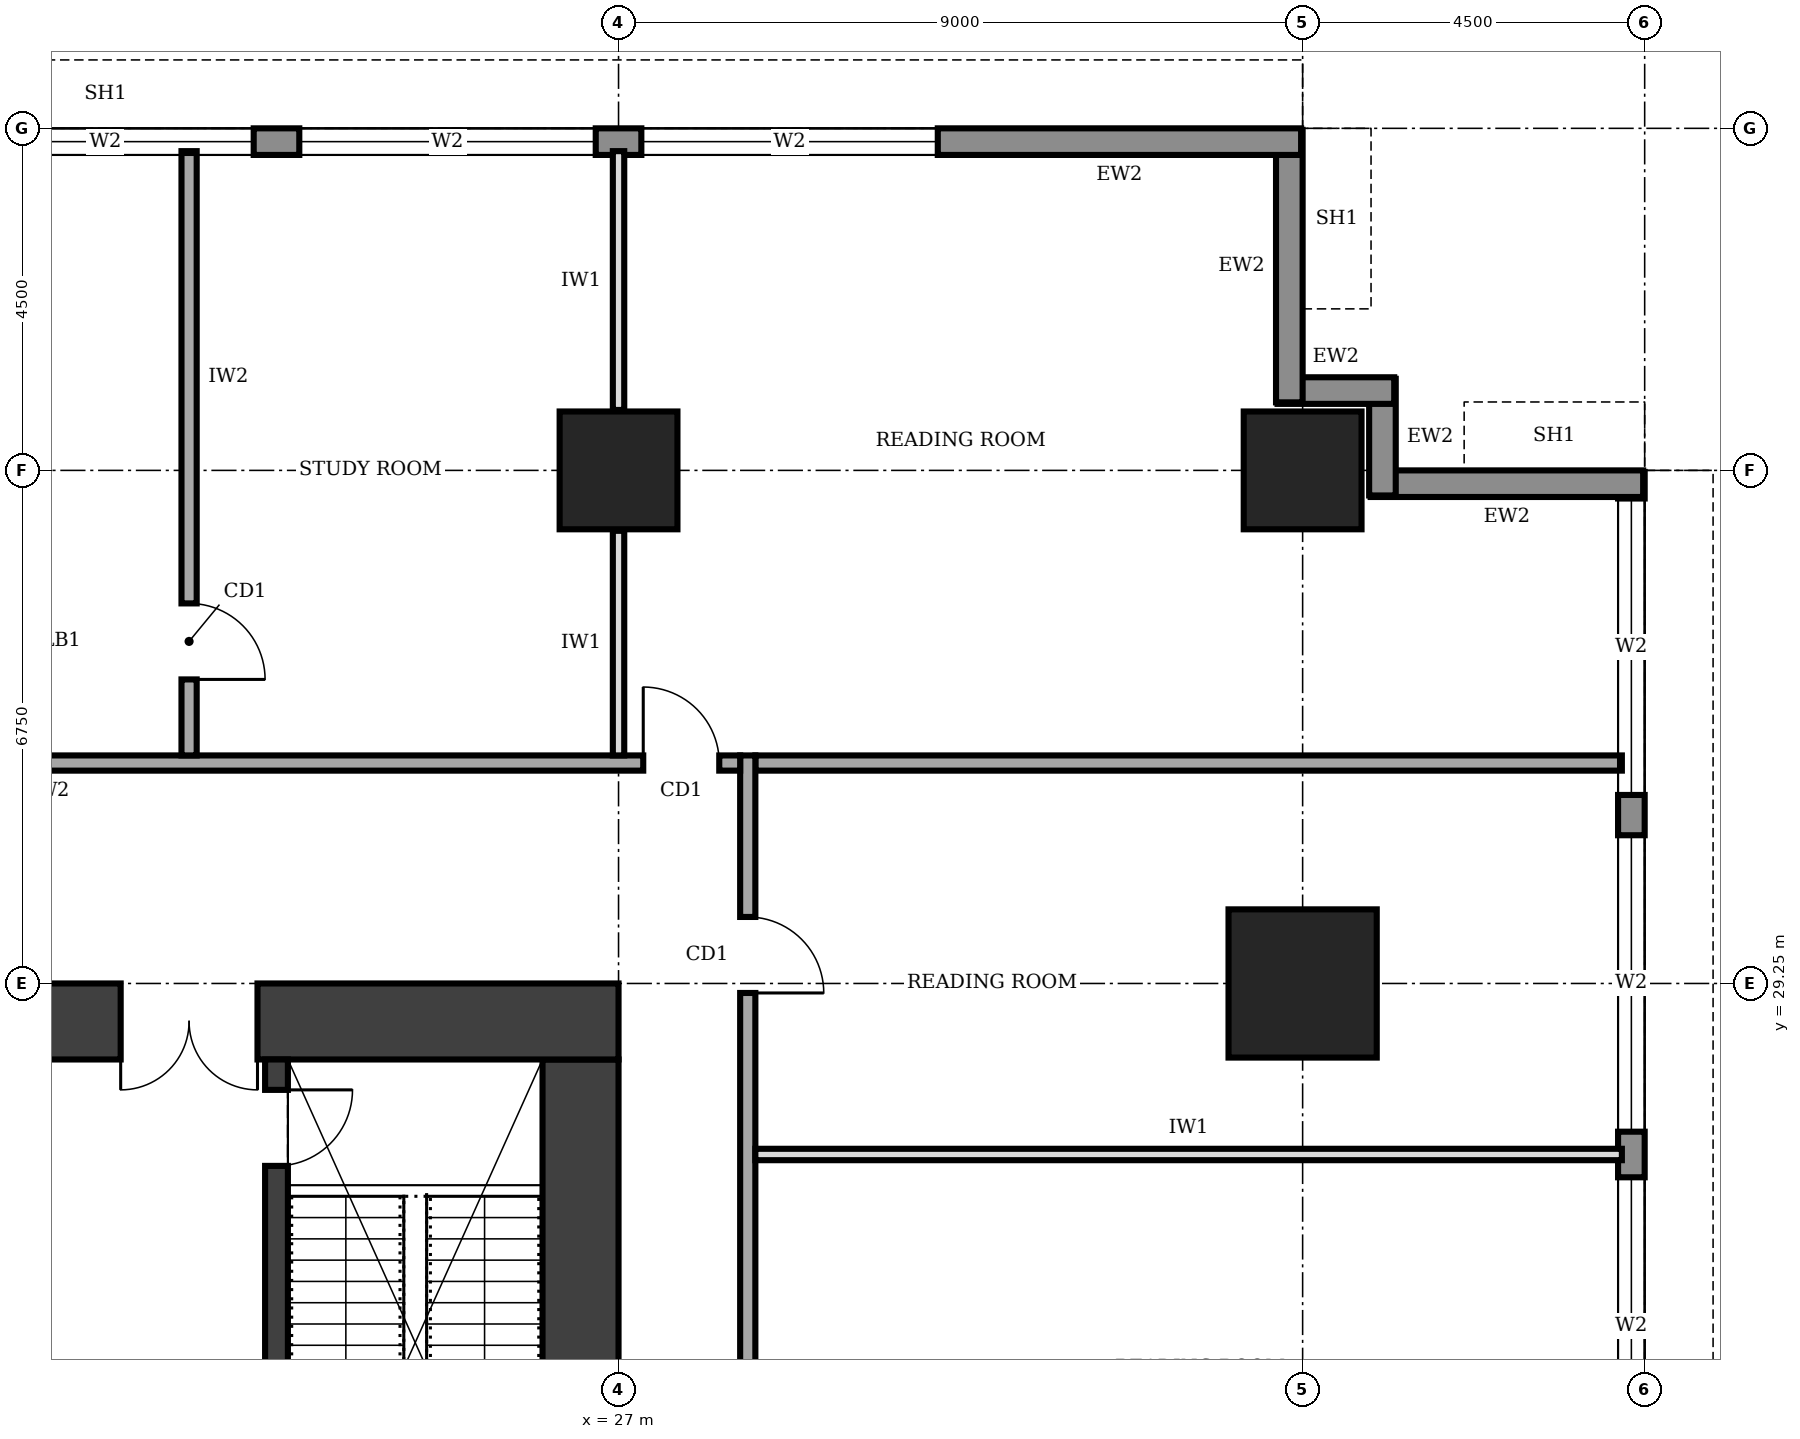
"""IFC4 building model, lengths in metres.
Left out: names, types, materials, properties, quantities, classifications, styles, units other than length and angle.
Written with IfcOpenShell. Run it as: python <this file> out.ifc"""

import sys

from ifc_helpers import new_model, si_unit, direction, frame, frame_2d, origin, origin_2d, place, context, subcontext, project, spatial, rectangle, extrude, element, fill, save


model = new_model("IFC4")
c1 = context("Model", 3, precision=1e-05, world=origin(), true_north=direction((0.0, 1.0)))
c2 = subcontext(c1, "Body", "Model", "MODEL_VIEW")
j1 = project(units=[si_unit("LENGTHUNIT", "METRE"), si_unit("PLANEANGLEUNIT", "RADIAN")], contexts=[c1])
p1 = place(None, origin())
s1 = spatial("IfcSite", under=j1, at=p1, CompositionType="ELEMENT")
p2 = place(p1, origin())
s2 = spatial("IfcBuilding", under=s1, at=p2, CompositionType="ELEMENT")
p3 = place(p2, frame((0.0, 0.0, 237.0)))
s3 = spatial("IfcBuildingStorey", under=s2, at=p3, CompositionType="ELEMENT", Elevation=237.0)
p4 = place(p3, frame((26.5, 12.25, 0.0), z_axis=(0.0, 0.0, 1.0), x_axis=(0.0, 1.0, 0.0)))
e1 = element("IfcWall", 1, at=p4, inside=s3, PredefinedType="SHEAR", context=c2, shape_type="SweptSolid", body=[
    extrude(rectangle(XDim=16.0, YDim=1.0, at=frame_2d((8.0, 0.0))), origin(), (0.0, 0.0, 1.0), 4.0),
])
p5 = place(p3, frame((27.0, 28.75, 0.0), z_axis=(0.0, 0.0, 1.0), x_axis=(-1.0, 0.0, 0.0)))
e2 = element("IfcWall", 2, at=p5, inside=s3, PredefinedType="SHEAR", context=c2, shape_type="SweptSolid", body=[
    extrude(rectangle(XDim=13.5, YDim=1.0, at=frame_2d((6.75, 0.0))), origin(), (0.0, 0.0, 1.0), 4.0),
])
p6 = place(p5, frame((4.75, 0.0, 0.0)))
e3 = element("IfcOpeningElement", 3, at=p6, cuts=e2, PredefinedType="OPENING", context=c2, shape_type="SweptSolid", body=[
    extrude(rectangle(XDim=1.8, YDim=2.1, at=frame_2d((0.9, 1.05))), frame((0.0, 0.51, 0.0), z_axis=(0.0, -1.0, 0.0), x_axis=(1.0, 0.0, 0.0)), (0.0, 0.0, 1.0), 1.02),
])
p7 = place(p3, frame((22.5, 12.25, 0.0), z_axis=(0.0, 0.0, 1.0), x_axis=(0.0, 1.0, 0.0)))
e4 = element("IfcWall", 4, at=p7, inside=s3, PredefinedType="SHEAR", context=c2, shape_type="SweptSolid", body=[
    extrude(rectangle(XDim=16.0, YDim=0.3, at=frame_2d((8.0, 0.0))), origin(), (0.0, 0.0, 1.0), 4.0),
])
p8 = place(p7, frame((14.6, 0.0, 0.0)))
e5 = element("IfcOpeningElement", 5, at=p8, cuts=e4, PredefinedType="OPENING", context=c2, shape_type="SweptSolid", body=[
    extrude(rectangle(XDim=1.0, YDim=2.1, at=frame_2d((0.5, 1.05))), frame((0.0, 0.16, 0.0), z_axis=(0.0, -1.0, 0.0), x_axis=(1.0, 0.0, 0.0)), (0.0, 0.0, 1.0), 0.32),
])
p9 = place(p7, frame((0.375, 0.0, 0.0)))
e6 = element("IfcOpeningElement", 6, at=p9, cuts=e4, PredefinedType="OPENING", context=c2, shape_type="SweptSolid", body=[
    extrude(rectangle(XDim=1.1, YDim=2.1, at=frame_2d((0.55, 1.05))), frame((0.0, 0.16, 0.0), z_axis=(0.0, -1.0, 0.0), x_axis=(1.0, 0.0, 0.0)), (0.0, 0.0, 1.0), 0.32),
])
p10 = place(p7, frame((3.7, 0.0, 0.0)))
e7 = element("IfcOpeningElement", 7, at=p10, cuts=e4, PredefinedType="OPENING", context=c2, shape_type="SweptSolid", body=[
    extrude(rectangle(XDim=1.1, YDim=2.1, at=frame_2d((0.55, 1.05))), frame((0.0, 0.16, 0.0), z_axis=(0.0, -1.0, 0.0), x_axis=(1.0, 0.0, 0.0)), (0.0, 0.0, 1.0), 0.32),
])
p11 = place(p7, frame((5.95, 0.0, 0.0)))
e8 = element("IfcOpeningElement", 8, at=p11, cuts=e4, PredefinedType="OPENING", context=c2, shape_type="SweptSolid", body=[
    extrude(rectangle(XDim=1.1, YDim=2.1, at=frame_2d((0.55, 1.05))), frame((0.0, 0.16, 0.0), z_axis=(0.0, -1.0, 0.0), x_axis=(1.0, 0.0, 0.0)), (0.0, 0.0, 1.0), 0.32),
])
p12 = place(p3, frame((36.0, 29.25, 0.0), z_axis=(0.0, 0.0, 1.0), x_axis=(1.0, 0.0, 0.0)))
e9 = element("IfcColumn", 9, at=p12, inside=s3, PredefinedType="COLUMN", context=c2, shape_type="SweptSolid", body=[
    extrude(rectangle(XDim=1.95, YDim=1.95, at=origin_2d()), origin(), (0.0, 0.0, 1.0), 4.0),
])
for number, where, z_axis, x_axis in (
    (10, (27.0, 36.0, 0.0), (0.0, 0.0, 1.0), (1.0, 0.0, 0.0)),
    (11, (36.0, 36.0, 0.0), (0.0, 0.0, 1.0), (1.0, 0.0, 0.0)),
):
    element("IfcColumn", number, at=place(p3, frame(where, z_axis=z_axis, x_axis=x_axis)), inside=s3, PredefinedType="COLUMN", context=c2, shape_type="SweptSolid", body=[
        extrude(rectangle(XDim=1.55, YDim=1.55, at=origin_2d()), origin(), (0.0, 0.0, 1.0), 4.0),
    ])
p13 = place(p3, frame((40.325, 4.52, 0.0), z_axis=(0.0, 0.0, 1.0), x_axis=(0.0, 1.0, 0.0)))
e12 = element("IfcWall", 12, at=p13, inside=s3, PredefinedType="STANDARD", context=c2, shape_type="SweptSolid", body=[
    extrude(rectangle(XDim=31.46, YDim=0.35, at=frame_2d((15.73, 0.0))), origin(), (0.0, 0.0, 1.0), 3.75),
])
p14 = place(p13, frame((4.78, 0.0, 0.6)))
e13 = element("IfcOpeningElement", 13, at=p14, cuts=e12, PredefinedType="OPENING", context=c2, shape_type="SweptSolid", body=[
    extrude(rectangle(XDim=3.9, YDim=2.6, at=frame_2d((1.95, 1.3))), frame((0.0, 0.185, 0.0), z_axis=(0.0, -1.0, 0.0), x_axis=(1.0, 0.0, 0.0)), (0.0, 0.0, 1.0), 0.37),
])
p15 = place(p13, frame((9.28, 0.0, 0.6)))
e14 = element("IfcOpeningElement", 14, at=p15, cuts=e12, PredefinedType="OPENING", context=c2, shape_type="SweptSolid", body=[
    extrude(rectangle(XDim=3.9, YDim=2.6, at=frame_2d((1.95, 1.3))), frame((0.0, 0.185, 0.0), z_axis=(0.0, -1.0, 0.0), x_axis=(1.0, 0.0, 0.0)), (0.0, 0.0, 1.0), 0.37),
])
p16 = place(p13, frame((13.78, 0.0, 0.6)))
e15 = element("IfcOpeningElement", 15, at=p16, cuts=e12, PredefinedType="OPENING", context=c2, shape_type="SweptSolid", body=[
    extrude(rectangle(XDim=3.9, YDim=2.6, at=frame_2d((1.95, 1.3))), frame((0.0, 0.185, 0.0), z_axis=(0.0, -1.0, 0.0), x_axis=(1.0, 0.0, 0.0)), (0.0, 0.0, 1.0), 0.37),
])
p17 = place(p13, frame((18.28, 0.0, 0.6)))
e16 = element("IfcOpeningElement", 16, at=p17, cuts=e12, PredefinedType="OPENING", context=c2, shape_type="SweptSolid", body=[
    extrude(rectangle(XDim=3.9, YDim=2.6, at=frame_2d((1.95, 1.3))), frame((0.0, 0.185, 0.0), z_axis=(0.0, -1.0, 0.0), x_axis=(1.0, 0.0, 0.0)), (0.0, 0.0, 1.0), 0.37),
])
p18 = place(p13, frame((22.78, 0.0, 0.6)))
e17 = element("IfcOpeningElement", 17, at=p18, cuts=e12, PredefinedType="OPENING", context=c2, shape_type="SweptSolid", body=[
    extrude(rectangle(XDim=3.9, YDim=2.6, at=frame_2d((1.95, 1.3))), frame((0.0, 0.185, 0.0), z_axis=(0.0, -1.0, 0.0), x_axis=(1.0, 0.0, 0.0)), (0.0, 0.0, 1.0), 0.37),
])
p19 = place(p13, frame((27.21, 0.0, 0.6)))
e18 = element("IfcOpeningElement", 18, at=p19, cuts=e12, PredefinedType="OPENING", context=c2, shape_type="SweptSolid", body=[
    extrude(rectangle(XDim=3.9, YDim=2.6, at=frame_2d((1.95, 1.3))), frame((0.0, 0.185, 0.0), z_axis=(0.0, -1.0, 0.0), x_axis=(1.0, 0.0, 0.0)), (0.0, 0.0, 1.0), 0.37),
])
p20 = place(p3, frame((40.48, 35.825, 0.0), z_axis=(0.0, 0.0, 1.0), x_axis=(-1.0, 0.0, 0.0)))
e19 = element("IfcWall", 19, at=p20, inside=s3, PredefinedType="STANDARD", context=c2, shape_type="SweptSolid", body=[
    extrude(rectangle(XDim=3.585, YDim=0.35, at=frame_2d((1.792, 0.0))), origin(), (0.0, 0.0, 1.0), 2.85),
])
for number, where, z_axis, x_axis in (
    (20, (37.05, 35.67, 0.0), (0.0, 0.0, 1.0), (0.0, 1.0, 0.0)),
    (21, (37.205, 37.05, 0.0), (0.0, 0.0, 1.0), (-1.0, 0.0, 0.0)),
):
    element("IfcWall", number, at=place(p3, frame(where, z_axis=z_axis, x_axis=x_axis)), inside=s3, PredefinedType="STANDARD", context=c2, shape_type="SweptSolid", body=[
        extrude(rectangle(XDim=1.535, YDim=0.35, at=frame_2d((0.768, 0.0))), origin(), (0.0, 0.0, 1.0), 3.75),
    ])
p21 = place(p3, frame((35.825, 36.895, 0.0), z_axis=(0.0, 0.0, 1.0), x_axis=(0.0, 1.0, 0.0)))
e22 = element("IfcWall", 22, at=p21, inside=s3, PredefinedType="STANDARD", context=c2, shape_type="SweptSolid", body=[
    extrude(rectangle(XDim=3.585, YDim=0.35, at=frame_2d((1.792, 0.0))), origin(), (0.0, 0.0, 1.0), 2.85),
])
p22 = place(p3, frame((35.98, 40.325, 0.0), z_axis=(0.0, 0.0, 1.0), x_axis=(-1.0, 0.0, 0.0)))
e23 = element("IfcWall", 23, at=p22, inside=s3, PredefinedType="STANDARD", context=c2, shape_type="SweptSolid", body=[
    extrude(rectangle(XDim=31.46, YDim=0.35, at=frame_2d((15.73, 0.0))), origin(), (0.0, 0.0, 1.0), 3.75),
])
p23 = place(p22, frame((27.21, 0.0, 0.6)))
e24 = element("IfcOpeningElement", 24, at=p23, cuts=e23, PredefinedType="OPENING", context=c2, shape_type="SweptSolid", body=[
    extrude(rectangle(XDim=3.9, YDim=2.6, at=frame_2d((1.95, 1.3))), frame((0.0, 0.185, 0.0), z_axis=(0.0, -1.0, 0.0), x_axis=(1.0, 0.0, 0.0)), (0.0, 0.0, 1.0), 0.37),
])
p24 = place(p22, frame((22.78, 0.0, 0.6)))
e25 = element("IfcOpeningElement", 25, at=p24, cuts=e23, PredefinedType="OPENING", context=c2, shape_type="SweptSolid", body=[
    extrude(rectangle(XDim=3.9, YDim=2.6, at=frame_2d((1.95, 1.3))), frame((0.0, 0.185, 0.0), z_axis=(0.0, -1.0, 0.0), x_axis=(1.0, 0.0, 0.0)), (0.0, 0.0, 1.0), 0.37),
])
p25 = place(p22, frame((18.28, 0.0, 0.6)))
e26 = element("IfcOpeningElement", 26, at=p25, cuts=e23, PredefinedType="OPENING", context=c2, shape_type="SweptSolid", body=[
    extrude(rectangle(XDim=3.9, YDim=2.6, at=frame_2d((1.95, 1.3))), frame((0.0, 0.185, 0.0), z_axis=(0.0, -1.0, 0.0), x_axis=(1.0, 0.0, 0.0)), (0.0, 0.0, 1.0), 0.37),
])
p26 = place(p22, frame((13.78, 0.0, 0.6)))
e27 = element("IfcOpeningElement", 27, at=p26, cuts=e23, PredefinedType="OPENING", context=c2, shape_type="SweptSolid", body=[
    extrude(rectangle(XDim=3.9, YDim=2.6, at=frame_2d((1.95, 1.3))), frame((0.0, 0.185, 0.0), z_axis=(0.0, -1.0, 0.0), x_axis=(1.0, 0.0, 0.0)), (0.0, 0.0, 1.0), 0.37),
])
p27 = place(p22, frame((9.28, 0.0, 0.6)))
e28 = element("IfcOpeningElement", 28, at=p27, cuts=e23, PredefinedType="OPENING", context=c2, shape_type="SweptSolid", body=[
    extrude(rectangle(XDim=3.9, YDim=2.6, at=frame_2d((1.95, 1.3))), frame((0.0, 0.185, 0.0), z_axis=(0.0, -1.0, 0.0), x_axis=(1.0, 0.0, 0.0)), (0.0, 0.0, 1.0), 0.37),
])
p28 = place(p22, frame((4.78, 0.0, 0.6)))
e29 = element("IfcOpeningElement", 29, at=p28, cuts=e23, PredefinedType="OPENING", context=c2, shape_type="SweptSolid", body=[
    extrude(rectangle(XDim=3.9, YDim=2.6, at=frame_2d((1.95, 1.3))), frame((0.0, 0.185, 0.0), z_axis=(0.0, -1.0, 0.0), x_axis=(1.0, 0.0, 0.0)), (0.0, 0.0, 1.0), 0.37),
])
p29 = place(p3, frame((28.7, 9.2, 0.0), z_axis=(0.0, 0.0, 1.0), x_axis=(0.0, 1.0, 0.0)))
e30 = element("IfcWall", 30, at=p29, inside=s3, PredefinedType="SOLIDWALL", context=c2, shape_type="SweptSolid", body=[
    extrude(rectangle(XDim=23.05, YDim=0.2, at=frame_2d((11.525, 0.0))), origin(), (0.0, 0.0, 1.0), 3.75),
])
p30 = place(p29, frame((3.4, 0.0, 0.0)))
e31 = element("IfcOpeningElement", 31, at=p30, cuts=e30, PredefinedType="OPENING", context=c2, shape_type="SweptSolid", body=[
    extrude(rectangle(XDim=1.8, YDim=2.1, at=frame_2d((0.9, 1.05))), frame((0.0, 0.11, 0.0), z_axis=(0.0, -1.0, 0.0), x_axis=(1.0, 0.0, 0.0)), (0.0, 0.0, 1.0), 0.22),
])
p31 = place(p29, frame((12.4, 0.0, 0.0)))
e32 = element("IfcOpeningElement", 32, at=p31, cuts=e30, PredefinedType="OPENING", context=c2, shape_type="SweptSolid", body=[
    extrude(rectangle(XDim=1.8, YDim=2.1, at=frame_2d((0.9, 1.05))), frame((0.0, 0.11, 0.0), z_axis=(0.0, -1.0, 0.0), x_axis=(1.0, 0.0, 0.0)), (0.0, 0.0, 1.0), 0.22),
])
p32 = place(p29, frame((19.925, 0.0, 0.0)))
e33 = element("IfcOpeningElement", 33, at=p32, cuts=e30, PredefinedType="OPENING", context=c2, shape_type="SweptSolid", body=[
    extrude(rectangle(XDim=1.0, YDim=2.1, at=frame_2d((0.5, 1.05))), frame((0.0, 0.11, 0.0), z_axis=(0.0, -1.0, 0.0), x_axis=(1.0, 0.0, 0.0)), (0.0, 0.0, 1.0), 0.22),
])
p33 = place(p3, frame((28.6, 32.15, 0.0), z_axis=(0.0, 0.0, 1.0), x_axis=(-1.0, 0.0, 0.0)))
e34 = element("IfcWall", 34, at=p33, inside=s3, PredefinedType="SOLIDWALL", context=c2, shape_type="SweptSolid", body=[
    extrude(rectangle(XDim=16.9, YDim=0.2, at=frame_2d((8.45, 0.0))), origin(), (0.0, 0.0, 1.0), 3.75),
])
p34 = place(p33, frame((0.275, 0.0, 0.0)))
e35 = element("IfcOpeningElement", 35, at=p34, cuts=e34, PredefinedType="OPENING", context=c2, shape_type="SweptSolid", body=[
    extrude(rectangle(XDim=1.0, YDim=2.1, at=frame_2d((0.5, 1.05))), frame((0.0, 0.11, 0.0), z_axis=(0.0, -1.0, 0.0), x_axis=(1.0, 0.0, 0.0)), (0.0, 0.0, 1.0), 0.22),
])
p35 = place(p3, frame((21.35, 40.2, 0.0), z_axis=(0.0, 0.0, 1.0), x_axis=(0.0, -1.0, 0.0)))
e36 = element("IfcWall", 36, at=p35, inside=s3, PredefinedType="SOLIDWALL", context=c2, shape_type="SweptSolid", body=[
    extrude(rectangle(XDim=7.95, YDim=0.2, at=frame_2d((3.975, 0.0))), origin(), (0.0, 0.0, 1.0), 3.75),
])
p36 = place(p35, frame((5.95, 0.0, 0.0)))
e37 = element("IfcOpeningElement", 37, at=p36, cuts=e36, PredefinedType="OPENING", context=c2, shape_type="SweptSolid", body=[
    extrude(rectangle(XDim=1.0, YDim=2.1, at=frame_2d((0.5, 1.05))), frame((0.0, 0.11, 0.0), z_axis=(0.0, -1.0, 0.0), x_axis=(1.0, 0.0, 0.0)), (0.0, 0.0, 1.0), 0.22),
])
p37 = place(p3, frame((28.8, 32.15, 0.0), z_axis=(0.0, 0.0, 1.0), x_axis=(1.0, 0.0, 0.0)))
e38 = element("IfcWall", 38, at=p37, inside=s3, PredefinedType="SOLIDWALL", context=c2, shape_type="SweptSolid", body=[
    extrude(rectangle(XDim=11.4, YDim=0.2, at=frame_2d((5.7, 0.0))), origin(), (0.0, 0.0, 1.0), 3.75),
])
p38 = place(p3, frame((27.0, 32.25, 0.0), z_axis=(0.0, 0.0, 1.0), x_axis=(0.0, 1.0, 0.0)))
e39 = element("IfcWall", 39, at=p38, inside=s3, PredefinedType="PARTITIONING", context=c2, shape_type="SweptSolid", body=[
    extrude(rectangle(XDim=2.955, YDim=0.15, at=frame_2d((1.478, 0.0))), origin(), (0.0, 0.0, 1.0), 2.85),
])
p39 = place(p3, frame((27.0, 36.795, 0.0), z_axis=(0.0, 0.0, 1.0), x_axis=(0.0, 1.0, 0.0)))
e40 = element("IfcWall", 40, at=p39, inside=s3, PredefinedType="PARTITIONING", context=c2, shape_type="SweptSolid", body=[
    extrude(rectangle(XDim=3.405, YDim=0.15, at=frame_2d((1.703, 0.0))), origin(), (0.0, 0.0, 1.0), 2.85),
])
p40 = place(p3, frame((28.8, 27.0, 0.0), z_axis=(0.0, 0.0, 1.0), x_axis=(1.0, 0.0, 0.0)))
e41 = element("IfcWall", 41, at=p40, inside=s3, PredefinedType="PARTITIONING", context=c2, shape_type="SweptSolid", body=[
    extrude(rectangle(XDim=11.4, YDim=0.15, at=frame_2d((5.7, 0.0))), origin(), (0.0, 0.0, 1.0), 3.75),
])
p41 = place(p17, origin())
e42 = element("IfcWindow", 42, at=p41, inside=s3, PartitioningType="SINGLE_PANEL", PredefinedType="WINDOW", context=c2, shape_type="SweptSolid", body=[
    extrude(rectangle(XDim=3.9, YDim=2.6, at=frame_2d((1.95, 1.3))), frame((0.0, 0.03, 0.0), z_axis=(0.0, -1.0, 0.0), x_axis=(1.0, 0.0, 0.0)), (0.0, 0.0, 1.0), 0.06),
])
fill(e16, e42)
p42 = place(p18, origin())
e43 = element("IfcWindow", 43, at=p42, inside=s3, PartitioningType="SINGLE_PANEL", PredefinedType="WINDOW", context=c2, shape_type="SweptSolid", body=[
    extrude(rectangle(XDim=3.9, YDim=2.6, at=frame_2d((1.95, 1.3))), frame((0.0, 0.03, 0.0), z_axis=(0.0, -1.0, 0.0), x_axis=(1.0, 0.0, 0.0)), (0.0, 0.0, 1.0), 0.06),
])
fill(e17, e43)
p43 = place(p19, origin())
e44 = element("IfcWindow", 44, at=p43, inside=s3, PartitioningType="SINGLE_PANEL", PredefinedType="WINDOW", context=c2, shape_type="SweptSolid", body=[
    extrude(rectangle(XDim=3.9, YDim=2.6, at=frame_2d((1.95, 1.3))), frame((0.0, 0.03, 0.0), z_axis=(0.0, -1.0, 0.0), x_axis=(1.0, 0.0, 0.0)), (0.0, 0.0, 1.0), 0.06),
])
fill(e18, e44)
p44 = place(p26, origin())
e45 = element("IfcWindow", 45, at=p44, inside=s3, PartitioningType="SINGLE_PANEL", PredefinedType="WINDOW", context=c2, shape_type="SweptSolid", body=[
    extrude(rectangle(XDim=3.9, YDim=2.6, at=frame_2d((1.95, 1.3))), frame((0.0, 0.03, 0.0), z_axis=(0.0, -1.0, 0.0), x_axis=(1.0, 0.0, 0.0)), (0.0, 0.0, 1.0), 0.06),
])
fill(e27, e45)
p45 = place(p27, origin())
e46 = element("IfcWindow", 46, at=p45, inside=s3, PartitioningType="SINGLE_PANEL", PredefinedType="WINDOW", context=c2, shape_type="SweptSolid", body=[
    extrude(rectangle(XDim=3.9, YDim=2.6, at=frame_2d((1.95, 1.3))), frame((0.0, 0.03, 0.0), z_axis=(0.0, -1.0, 0.0), x_axis=(1.0, 0.0, 0.0)), (0.0, 0.0, 1.0), 0.06),
])
fill(e28, e46)
p46 = place(p28, origin())
e47 = element("IfcWindow", 47, at=p46, inside=s3, PartitioningType="SINGLE_PANEL", PredefinedType="WINDOW", context=c2, shape_type="SweptSolid", body=[
    extrude(rectangle(XDim=3.9, YDim=2.6, at=frame_2d((1.95, 1.3))), frame((0.0, 0.03, 0.0), z_axis=(0.0, -1.0, 0.0), x_axis=(1.0, 0.0, 0.0)), (0.0, 0.0, 1.0), 0.06),
])
fill(e29, e47)
p47 = place(p6, origin())
e48 = element("IfcDoor", 48, at=p47, inside=s3, OperationType="DOUBLE_DOOR_SINGLE_SWING", PredefinedType="DOOR", context=c2, shape_type="SweptSolid", body=[
    extrude(rectangle(XDim=1.8, YDim=2.1, at=frame_2d((0.9, 1.05))), frame((0.0, 0.025, 0.0), z_axis=(0.0, -1.0, 0.0), x_axis=(1.0, 0.0, 0.0)), (0.0, 0.0, 1.0), 0.05),
])
fill(e3, e48)
p48 = place(p8, frame((1.0, 0.0, 0.0), z_axis=(0.0, 0.0, 1.0), x_axis=(-1.0, 0.0, 0.0)))
e49 = element("IfcDoor", 49, at=p48, inside=s3, OperationType="SINGLE_SWING_LEFT", PredefinedType="DOOR", context=c2, shape_type="SweptSolid", body=[
    extrude(rectangle(XDim=1.0, YDim=2.1, at=frame_2d((0.5, 1.05))), frame((0.0, 0.025, 0.0), z_axis=(0.0, -1.0, 0.0), x_axis=(1.0, 0.0, 0.0)), (0.0, 0.0, 1.0), 0.05),
])
fill(e5, e49)
p49 = place(p32, frame((1.0, 0.0, 0.0), z_axis=(0.0, 0.0, 1.0), x_axis=(-1.0, 0.0, 0.0)))
e50 = element("IfcDoor", 50, at=p49, inside=s3, OperationType="SINGLE_SWING_RIGHT", PredefinedType="DOOR", context=c2, shape_type="SweptSolid", body=[
    extrude(rectangle(XDim=1.0, YDim=2.1, at=frame_2d((0.5, 1.05))), frame((0.0, 0.025, 0.0), z_axis=(0.0, -1.0, 0.0), x_axis=(1.0, 0.0, 0.0)), (0.0, 0.0, 1.0), 0.05),
])
fill(e33, e50)
p50 = place(p34, frame((1.0, 0.0, 0.0), z_axis=(0.0, 0.0, 1.0), x_axis=(-1.0, 0.0, 0.0)))
e51 = element("IfcDoor", 51, at=p50, inside=s3, OperationType="SINGLE_SWING_LEFT", PredefinedType="DOOR", context=c2, shape_type="SweptSolid", body=[
    extrude(rectangle(XDim=1.0, YDim=2.1, at=frame_2d((0.5, 1.05))), frame((0.0, 0.025, 0.0), z_axis=(0.0, -1.0, 0.0), x_axis=(1.0, 0.0, 0.0)), (0.0, 0.0, 1.0), 0.05),
])
fill(e35, e51)
p51 = place(p36, origin())
e52 = element("IfcDoor", 52, at=p51, inside=s3, OperationType="SINGLE_SWING_RIGHT", PredefinedType="DOOR", context=c2, shape_type="SweptSolid", body=[
    extrude(rectangle(XDim=1.0, YDim=2.1, at=frame_2d((0.5, 1.05))), frame((0.0, 0.025, 0.0), z_axis=(0.0, -1.0, 0.0), x_axis=(1.0, 0.0, 0.0)), (0.0, 0.0, 1.0), 0.05),
])
fill(e37, e52)
save(model, sys.argv[1])
